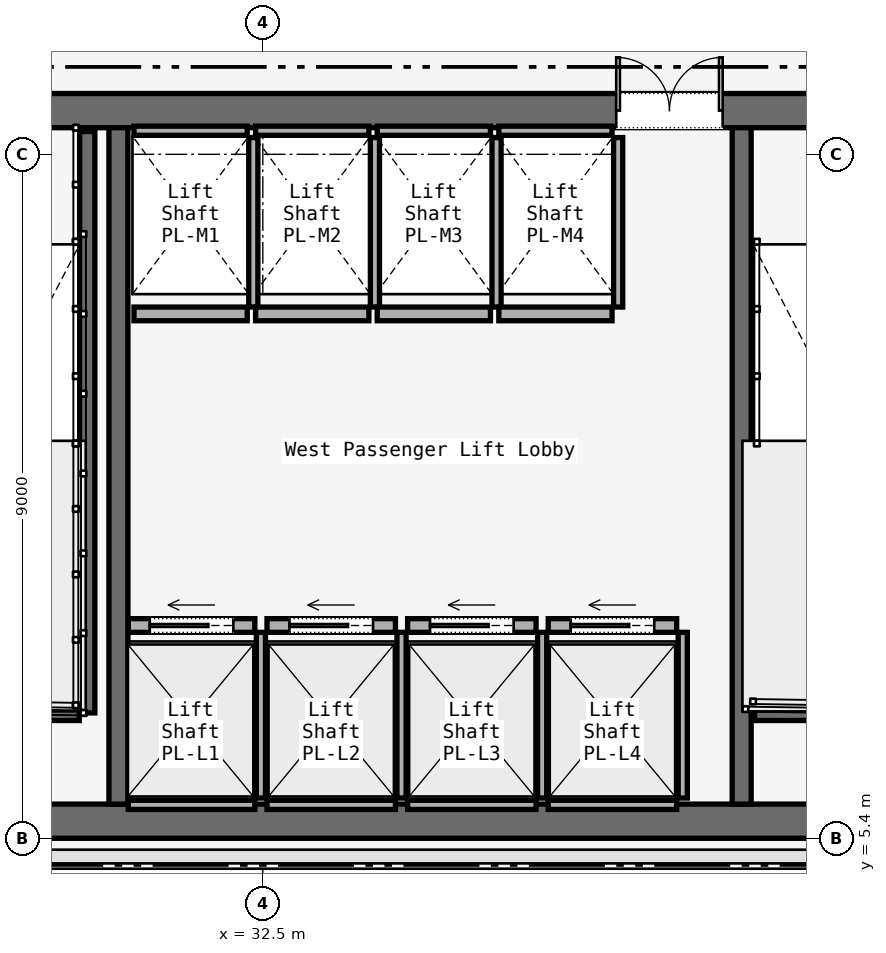
"""IFC4 building model, lengths in metres.
Left out: names, types, materials, properties, quantities, classifications, styles, units other than length and angle.
Written with IfcOpenShell. Run it as: python <this file> out.ifc"""

import sys

from ifc_helpers import new_model, si_unit, direction, frame, frame_2d, origin, place, context, subcontext, project, spatial, rectangle, extrude, element, fill, save


model = new_model("IFC4")
c1 = context("Model", 3, precision=1e-05, world=origin(), true_north=direction((0.0, 1.0)))
c2 = subcontext(c1, "Body", "Model", "MODEL_VIEW")
j1 = project(units=[si_unit("LENGTHUNIT", "METRE"), si_unit("PLANEANGLEUNIT", "RADIAN")], contexts=[c1])
p1 = place(None, origin())
s1 = spatial("IfcSite", under=j1, at=p1, CompositionType="ELEMENT")
p2 = place(p1, origin())
s2 = spatial("IfcBuilding", under=s1, at=p2, CompositionType="ELEMENT")
p3 = place(p2, frame((0.0, 0.0, 70.2)))
s3 = spatial("IfcBuildingStorey", under=s2, at=p3, CompositionType="ELEMENT", Elevation=70.2)
p4 = place(p3, frame((26.45, 14.975, 0.0), z_axis=(0.0, 0.0, 1.0), x_axis=(1.0, 0.0, 0.0)))
e1 = element("IfcWall", 1, at=p4, inside=s3, PredefinedType="SOLIDWALL", context=c2, shape_type="SweptSolid", body=[
    extrude(rectangle(XDim=31.1, YDim=0.45, at=frame_2d((15.55, 0.0))), origin(), (0.0, 0.0, 1.0), 3.58),
])
p5 = place(p4, frame((1.65, 0.0, 0.0)))
e2 = element("IfcOpeningElement", 2, at=p5, cuts=e1, PredefinedType="OPENING", context=c2, shape_type="SweptSolid", body=[
    extrude(rectangle(XDim=1.1, YDim=2.2, at=frame_2d((0.55, 1.1))), frame((0.0, 0.225, 0.0), z_axis=(0.0, -1.0, 0.0), x_axis=(1.0, 0.0, 0.0)), (0.0, 0.0, 1.0), 0.45),
])
p6 = place(p4, frame((13.65, 0.0, 0.0)))
e3 = element("IfcOpeningElement", 3, at=p6, cuts=e1, PredefinedType="OPENING", context=c2, shape_type="SweptSolid", body=[
    extrude(rectangle(XDim=1.1, YDim=2.2, at=frame_2d((0.55, 1.1))), frame((0.0, 0.225, 0.0), z_axis=(0.0, -1.0, 0.0), x_axis=(1.0, 0.0, 0.0)), (0.0, 0.0, 1.0), 0.45),
])
p7 = place(p4, frame((25.55, 0.0, 0.0)))
e4 = element("IfcOpeningElement", 4, at=p7, cuts=e1, PredefinedType="OPENING", context=c2, shape_type="SweptSolid", body=[
    extrude(rectangle(XDim=1.1, YDim=2.2, at=frame_2d((0.55, 1.1))), frame((0.0, 0.225, 0.0), z_axis=(0.0, -1.0, 0.0), x_axis=(1.0, 0.0, 0.0)), (0.0, 0.0, 1.0), 0.45),
])
p8 = place(p4, frame((10.7, 0.0, 0.0)))
e5 = element("IfcOpeningElement", 5, at=p8, cuts=e1, PredefinedType="OPENING", context=c2, shape_type="SweptSolid", body=[
    extrude(rectangle(XDim=1.4, YDim=2.2, at=frame_2d((0.7, 1.1))), frame((0.0, 0.225, 0.0), z_axis=(0.0, -1.0, 0.0), x_axis=(1.0, 0.0, 0.0)), (0.0, 0.0, 1.0), 0.45),
])
p9 = place(p4, frame((19.35, 0.0, 0.0)))
e6 = element("IfcOpeningElement", 6, at=p9, cuts=e1, PredefinedType="OPENING", context=c2, shape_type="SweptSolid", body=[
    extrude(rectangle(XDim=1.1, YDim=2.2, at=frame_2d((0.55, 1.1))), frame((0.0, 0.225, 0.0), z_axis=(0.0, -1.0, 0.0), x_axis=(1.0, 0.0, 0.0)), (0.0, 0.0, 1.0), 0.45),
])
p10 = place(p4, frame((21.4, 0.0, 0.0)))
e7 = element("IfcOpeningElement", 7, at=p10, cuts=e1, PredefinedType="OPENING", context=c2, shape_type="SweptSolid", body=[
    extrude(rectangle(XDim=0.9, YDim=2.1, at=frame_2d((0.45, 1.05))), frame((0.0, 0.225, 0.0), z_axis=(0.0, -1.0, 0.0), x_axis=(1.0, 0.0, 0.0)), (0.0, 0.0, 1.0), 0.45),
])
p11 = place(p4, frame((23.35, 0.0, 0.0)))
e8 = element("IfcOpeningElement", 8, at=p11, cuts=e1, PredefinedType="OPENING", context=c2, shape_type="SweptSolid", body=[
    extrude(rectangle(XDim=1.3, YDim=2.3, at=frame_2d((0.65, 1.15))), frame((0.0, 0.225, 0.0), z_axis=(0.0, -1.0, 0.0), x_axis=(1.0, 0.0, 0.0)), (0.0, 0.0, 1.0), 0.45),
])
p12 = place(p3, frame((26.45, 5.625, 0.0), z_axis=(0.0, 0.0, 1.0), x_axis=(1.0, 0.0, 0.0)))
e9 = element("IfcWall", 9, at=p12, inside=s3, PredefinedType="SOLIDWALL", context=c2, shape_type="SweptSolid", body=[
    extrude(rectangle(XDim=31.1, YDim=0.45, at=frame_2d((15.55, 0.0))), origin(), (0.0, 0.0, 1.0), 3.58),
])
for number, where, z_axis, x_axis in (
    (10, (30.6, 5.85, 0.0), (0.0, 0.0, 1.0), (0.0, 1.0, 0.0)),
    (11, (38.8, 5.85, 0.0), (0.0, 0.0, 1.0), (0.0, 1.0, 0.0)),
):
    element("IfcWall", number, at=place(p3, frame(where, z_axis=z_axis, x_axis=x_axis)), inside=s3, PredefinedType="SOLIDWALL", context=c2, shape_type="SweptSolid", body=[
        extrude(rectangle(XDim=8.9, YDim=0.25, at=frame_2d((4.45, 0.0))), origin(), (0.0, 0.0, 1.0), 3.58),
    ])
p13 = place(p3, frame((30.19, 14.7, 0.0), z_axis=(0.0, 0.0, 1.0), x_axis=(0.0, -1.0, 0.0)))
e12 = element("IfcWall", 12, at=p13, inside=s3, PredefinedType="SOLIDWALL", context=c2, shape_type="SweptSolid", body=[
    extrude(rectangle(XDim=7.65, YDim=0.2, at=frame_2d((3.825, 0.0))), origin(), (0.0, 0.0, 1.0), 3.8),
])
for number, where, z_axis, x_axis in (
    (13, (26.97, 7.05, 0.0), (0.0, 0.0, 1.0), (1.0, 0.0, 0.0)),
    (14, (38.97, 7.05, 0.0), (0.0, 0.0, 1.0), (1.0, 0.0, 0.0)),
):
    element("IfcWall", number, at=place(p3, frame(where, z_axis=z_axis, x_axis=x_axis)), inside=s3, PredefinedType="SOLIDWALL", context=c2, shape_type="SweptSolid", body=[
        extrude(rectangle(XDim=3.115, YDim=0.2, at=frame_2d((1.558, 0.0))), origin(), (0.0, 0.0, 1.0), 3.8),
    ])
p14 = place(p3, frame((30.73, 8.2, 0.0), z_axis=(0.0, 0.0, 1.0), x_axis=(1.0, 0.0, 0.0)))
e15 = element("IfcWall", 15, at=p14, inside=s3, PredefinedType="SOLIDWALL", context=c2, shape_type="SweptSolid", body=[
    extrude(rectangle(XDim=1.665, YDim=0.18, at=frame_2d((0.833, 0.0))), origin(), (0.0, 0.0, 1.0), 2.95),
])
p15 = place(p14, frame((0.282, 0.0, 0.0)))
e16 = element("IfcOpeningElement", 16, at=p15, cuts=e15, PredefinedType="OPENING", context=c2, shape_type="SweptSolid", body=[
    extrude(rectangle(XDim=1.1, YDim=2.2, at=frame_2d((0.55, 1.1))), frame((0.0, 0.09, 0.0), z_axis=(0.0, -1.0, 0.0), x_axis=(1.0, 0.0, 0.0)), (0.0, 0.0, 1.0), 0.18),
])
p16 = place(p3, frame((30.73, 5.84, 0.0), z_axis=(0.0, 0.0, 1.0), x_axis=(1.0, 0.0, 0.0)))
e17 = element("IfcWall", 17, at=p16, inside=s3, PredefinedType="SOLIDWALL", context=c2, shape_type="SweptSolid", body=[
    extrude(rectangle(XDim=1.665, YDim=0.12, at=frame_2d((0.833, 0.0))), origin(), (0.0, 0.0, 1.0), 2.95),
])
p17 = place(p3, frame((32.475, 5.93, 0.0), z_axis=(0.0, 0.0, 1.0), x_axis=(0.0, 1.0, 0.0)))
e18 = element("IfcWall", 18, at=p17, inside=s3, PredefinedType="SOLIDWALL", context=c2, shape_type="SweptSolid", body=[
    extrude(rectangle(XDim=2.18, YDim=0.12, at=frame_2d((1.09, 0.0))), origin(), (0.0, 0.0, 1.0), 2.95),
])
p18 = place(p3, frame((32.555, 8.2, 0.0), z_axis=(0.0, 0.0, 1.0), x_axis=(1.0, 0.0, 0.0)))
e19 = element("IfcWall", 19, at=p18, inside=s3, PredefinedType="SOLIDWALL", context=c2, shape_type="SweptSolid", body=[
    extrude(rectangle(XDim=1.69, YDim=0.18, at=frame_2d((0.845, 0.0))), origin(), (0.0, 0.0, 1.0), 2.95),
])
p19 = place(p18, frame((0.295, 0.0, 0.0)))
e20 = element("IfcOpeningElement", 20, at=p19, cuts=e19, PredefinedType="OPENING", context=c2, shape_type="SweptSolid", body=[
    extrude(rectangle(XDim=1.1, YDim=2.2, at=frame_2d((0.55, 1.1))), frame((0.0, 0.09, 0.0), z_axis=(0.0, -1.0, 0.0), x_axis=(1.0, 0.0, 0.0)), (0.0, 0.0, 1.0), 0.18),
])
p20 = place(p3, frame((32.555, 5.84, 0.0), z_axis=(0.0, 0.0, 1.0), x_axis=(1.0, 0.0, 0.0)))
e21 = element("IfcWall", 21, at=p20, inside=s3, PredefinedType="SOLIDWALL", context=c2, shape_type="SweptSolid", body=[
    extrude(rectangle(XDim=1.69, YDim=0.12, at=frame_2d((0.845, 0.0))), origin(), (0.0, 0.0, 1.0), 2.95),
])
p21 = place(p3, frame((34.325, 5.93, 0.0), z_axis=(0.0, 0.0, 1.0), x_axis=(0.0, 1.0, 0.0)))
e22 = element("IfcWall", 22, at=p21, inside=s3, PredefinedType="SOLIDWALL", context=c2, shape_type="SweptSolid", body=[
    extrude(rectangle(XDim=2.18, YDim=0.12, at=frame_2d((1.09, 0.0))), origin(), (0.0, 0.0, 1.0), 2.95),
])
p22 = place(p3, frame((34.405, 8.2, 0.0), z_axis=(0.0, 0.0, 1.0), x_axis=(1.0, 0.0, 0.0)))
e23 = element("IfcWall", 23, at=p22, inside=s3, PredefinedType="SOLIDWALL", context=c2, shape_type="SweptSolid", body=[
    extrude(rectangle(XDim=1.69, YDim=0.18, at=frame_2d((0.845, 0.0))), origin(), (0.0, 0.0, 1.0), 2.95),
])
p23 = place(p22, frame((0.295, 0.0, 0.0)))
e24 = element("IfcOpeningElement", 24, at=p23, cuts=e23, PredefinedType="OPENING", context=c2, shape_type="SweptSolid", body=[
    extrude(rectangle(XDim=1.1, YDim=2.2, at=frame_2d((0.55, 1.1))), frame((0.0, 0.09, 0.0), z_axis=(0.0, -1.0, 0.0), x_axis=(1.0, 0.0, 0.0)), (0.0, 0.0, 1.0), 0.18),
])
p24 = place(p3, frame((34.405, 5.84, 0.0), z_axis=(0.0, 0.0, 1.0), x_axis=(1.0, 0.0, 0.0)))
e25 = element("IfcWall", 25, at=p24, inside=s3, PredefinedType="SOLIDWALL", context=c2, shape_type="SweptSolid", body=[
    extrude(rectangle(XDim=1.69, YDim=0.12, at=frame_2d((0.845, 0.0))), origin(), (0.0, 0.0, 1.0), 2.95),
])
p25 = place(p3, frame((36.175, 5.93, 0.0), z_axis=(0.0, 0.0, 1.0), x_axis=(0.0, 1.0, 0.0)))
e26 = element("IfcWall", 26, at=p25, inside=s3, PredefinedType="SOLIDWALL", context=c2, shape_type="SweptSolid", body=[
    extrude(rectangle(XDim=2.18, YDim=0.12, at=frame_2d((1.09, 0.0))), origin(), (0.0, 0.0, 1.0), 2.95),
])
p26 = place(p3, frame((36.255, 8.2, 0.0), z_axis=(0.0, 0.0, 1.0), x_axis=(1.0, 0.0, 0.0)))
e27 = element("IfcWall", 27, at=p26, inside=s3, PredefinedType="SOLIDWALL", context=c2, shape_type="SweptSolid", body=[
    extrude(rectangle(XDim=1.69, YDim=0.18, at=frame_2d((0.845, 0.0))), origin(), (0.0, 0.0, 1.0), 2.95),
])
p27 = place(p26, frame((0.295, 0.0, 0.0)))
e28 = element("IfcOpeningElement", 28, at=p27, cuts=e27, PredefinedType="OPENING", context=c2, shape_type="SweptSolid", body=[
    extrude(rectangle(XDim=1.1, YDim=2.2, at=frame_2d((0.55, 1.1))), frame((0.0, 0.09, 0.0), z_axis=(0.0, -1.0, 0.0), x_axis=(1.0, 0.0, 0.0)), (0.0, 0.0, 1.0), 0.18),
])
p28 = place(p3, frame((36.255, 5.84, 0.0), z_axis=(0.0, 0.0, 1.0), x_axis=(1.0, 0.0, 0.0)))
e29 = element("IfcWall", 29, at=p28, inside=s3, PredefinedType="SOLIDWALL", context=c2, shape_type="SweptSolid", body=[
    extrude(rectangle(XDim=1.69, YDim=0.12, at=frame_2d((0.845, 0.0))), origin(), (0.0, 0.0, 1.0), 2.95),
])
p29 = place(p3, frame((38.025, 5.93, 0.0), z_axis=(0.0, 0.0, 1.0), x_axis=(0.0, 1.0, 0.0)))
e30 = element("IfcWall", 30, at=p29, inside=s3, PredefinedType="SOLIDWALL", context=c2, shape_type="SweptSolid", body=[
    extrude(rectangle(XDim=2.18, YDim=0.12, at=frame_2d((1.09, 0.0))), origin(), (0.0, 0.0, 1.0), 2.95),
])
p30 = place(p3, frame((30.805, 12.3, 0.0), z_axis=(0.0, 0.0, 1.0), x_axis=(1.0, 0.0, 0.0)))
e31 = element("IfcWall", 31, at=p30, inside=s3, PredefinedType="SOLIDWALL", context=c2, shape_type="SweptSolid", body=[
    extrude(rectangle(XDim=1.49, YDim=0.18, at=frame_2d((0.745, 0.0))), origin(), (0.0, 0.0, 1.0), 2.95),
])
p31 = place(p3, frame((30.805, 14.71, 0.0), z_axis=(0.0, 0.0, 1.0), x_axis=(1.0, 0.0, 0.0)))
e32 = element("IfcWall", 32, at=p31, inside=s3, PredefinedType="SOLIDWALL", context=c2, shape_type="SweptSolid", body=[
    extrude(rectangle(XDim=1.49, YDim=0.12, at=frame_2d((0.745, 0.0))), origin(), (0.0, 0.0, 1.0), 2.95),
])
p32 = place(p3, frame((32.375, 12.39, 0.0), z_axis=(0.0, 0.0, 1.0), x_axis=(0.0, 1.0, 0.0)))
e33 = element("IfcWall", 33, at=p32, inside=s3, PredefinedType="SOLIDWALL", context=c2, shape_type="SweptSolid", body=[
    extrude(rectangle(XDim=2.23, YDim=0.12, at=frame_2d((1.115, 0.0))), origin(), (0.0, 0.0, 1.0), 2.95),
])
p33 = place(p3, frame((32.405, 12.3, 0.0), z_axis=(0.0, 0.0, 1.0), x_axis=(1.0, 0.0, 0.0)))
e34 = element("IfcWall", 34, at=p33, inside=s3, PredefinedType="SOLIDWALL", context=c2, shape_type="SweptSolid", body=[
    extrude(rectangle(XDim=1.49, YDim=0.18, at=frame_2d((0.745, 0.0))), origin(), (0.0, 0.0, 1.0), 2.95),
])
p34 = place(p3, frame((32.405, 14.71, 0.0), z_axis=(0.0, 0.0, 1.0), x_axis=(1.0, 0.0, 0.0)))
e35 = element("IfcWall", 35, at=p34, inside=s3, PredefinedType="SOLIDWALL", context=c2, shape_type="SweptSolid", body=[
    extrude(rectangle(XDim=1.49, YDim=0.12, at=frame_2d((0.745, 0.0))), origin(), (0.0, 0.0, 1.0), 2.95),
])
p35 = place(p3, frame((33.975, 12.39, 0.0), z_axis=(0.0, 0.0, 1.0), x_axis=(0.0, 1.0, 0.0)))
e36 = element("IfcWall", 36, at=p35, inside=s3, PredefinedType="SOLIDWALL", context=c2, shape_type="SweptSolid", body=[
    extrude(rectangle(XDim=2.23, YDim=0.12, at=frame_2d((1.115, 0.0))), origin(), (0.0, 0.0, 1.0), 2.95),
])
p36 = place(p3, frame((34.005, 12.3, 0.0), z_axis=(0.0, 0.0, 1.0), x_axis=(1.0, 0.0, 0.0)))
e37 = element("IfcWall", 37, at=p36, inside=s3, PredefinedType="SOLIDWALL", context=c2, shape_type="SweptSolid", body=[
    extrude(rectangle(XDim=1.49, YDim=0.18, at=frame_2d((0.745, 0.0))), origin(), (0.0, 0.0, 1.0), 2.95),
])
p37 = place(p3, frame((34.005, 14.71, 0.0), z_axis=(0.0, 0.0, 1.0), x_axis=(1.0, 0.0, 0.0)))
e38 = element("IfcWall", 38, at=p37, inside=s3, PredefinedType="SOLIDWALL", context=c2, shape_type="SweptSolid", body=[
    extrude(rectangle(XDim=1.49, YDim=0.12, at=frame_2d((0.745, 0.0))), origin(), (0.0, 0.0, 1.0), 2.95),
])
p38 = place(p3, frame((35.575, 12.39, 0.0), z_axis=(0.0, 0.0, 1.0), x_axis=(0.0, 1.0, 0.0)))
e39 = element("IfcWall", 39, at=p38, inside=s3, PredefinedType="SOLIDWALL", context=c2, shape_type="SweptSolid", body=[
    extrude(rectangle(XDim=2.23, YDim=0.12, at=frame_2d((1.115, 0.0))), origin(), (0.0, 0.0, 1.0), 2.95),
])
p39 = place(p3, frame((35.605, 12.3, 0.0), z_axis=(0.0, 0.0, 1.0), x_axis=(1.0, 0.0, 0.0)))
e40 = element("IfcWall", 40, at=p39, inside=s3, PredefinedType="SOLIDWALL", context=c2, shape_type="SweptSolid", body=[
    extrude(rectangle(XDim=1.49, YDim=0.18, at=frame_2d((0.745, 0.0))), origin(), (0.0, 0.0, 1.0), 2.95),
])
p40 = place(p3, frame((35.605, 14.71, 0.0), z_axis=(0.0, 0.0, 1.0), x_axis=(1.0, 0.0, 0.0)))
e41 = element("IfcWall", 41, at=p40, inside=s3, PredefinedType="SOLIDWALL", context=c2, shape_type="SweptSolid", body=[
    extrude(rectangle(XDim=1.49, YDim=0.12, at=frame_2d((0.745, 0.0))), origin(), (0.0, 0.0, 1.0), 2.95),
])
p41 = place(p3, frame((37.175, 12.39, 0.0), z_axis=(0.0, 0.0, 1.0), x_axis=(0.0, 1.0, 0.0)))
e42 = element("IfcWall", 42, at=p41, inside=s3, PredefinedType="SOLIDWALL", context=c2, shape_type="SweptSolid", body=[
    extrude(rectangle(XDim=2.23, YDim=0.12, at=frame_2d((1.115, 0.0))), origin(), (0.0, 0.0, 1.0), 2.95),
])
p42 = place(p8, origin())
e43 = element("IfcDoor", 43, at=p42, inside=s3, OperationType="DOUBLE_DOOR_SINGLE_SWING", PredefinedType="DOOR", context=c2, shape_type="SweptSolid", body=[
    extrude(rectangle(XDim=1.4, YDim=2.2, at=frame_2d((0.7, 1.1))), frame((0.0, 0.025, 0.0), z_axis=(0.0, -1.0, 0.0), x_axis=(1.0, 0.0, 0.0)), (0.0, 0.0, 1.0), 0.05),
])
fill(e5, e43)
p43 = place(p15, origin())
e44 = element("IfcDoor", 44, at=p43, inside=s3, OperationType="SLIDING_TO_LEFT", PredefinedType="DOOR", context=c2, shape_type="SweptSolid", body=[
    extrude(rectangle(XDim=1.1, YDim=2.2, at=frame_2d((0.55, 1.1))), frame((0.0, 0.025, 0.0), z_axis=(0.0, -1.0, 0.0), x_axis=(1.0, 0.0, 0.0)), (0.0, 0.0, 1.0), 0.05),
])
fill(e16, e44)
p44 = place(p19, origin())
e45 = element("IfcDoor", 45, at=p44, inside=s3, OperationType="SLIDING_TO_LEFT", PredefinedType="DOOR", context=c2, shape_type="SweptSolid", body=[
    extrude(rectangle(XDim=1.1, YDim=2.2, at=frame_2d((0.55, 1.1))), frame((0.0, 0.025, 0.0), z_axis=(0.0, -1.0, 0.0), x_axis=(1.0, 0.0, 0.0)), (0.0, 0.0, 1.0), 0.05),
])
fill(e20, e45)
p45 = place(p23, origin())
e46 = element("IfcDoor", 46, at=p45, inside=s3, OperationType="SLIDING_TO_LEFT", PredefinedType="DOOR", context=c2, shape_type="SweptSolid", body=[
    extrude(rectangle(XDim=1.1, YDim=2.2, at=frame_2d((0.55, 1.1))), frame((0.0, 0.025, 0.0), z_axis=(0.0, -1.0, 0.0), x_axis=(1.0, 0.0, 0.0)), (0.0, 0.0, 1.0), 0.05),
])
fill(e24, e46)
p46 = place(p27, origin())
e47 = element("IfcDoor", 47, at=p46, inside=s3, OperationType="SLIDING_TO_LEFT", PredefinedType="DOOR", context=c2, shape_type="SweptSolid", body=[
    extrude(rectangle(XDim=1.1, YDim=2.2, at=frame_2d((0.55, 1.1))), frame((0.0, 0.025, 0.0), z_axis=(0.0, -1.0, 0.0), x_axis=(1.0, 0.0, 0.0)), (0.0, 0.0, 1.0), 0.05),
])
fill(e28, e47)
save(model, sys.argv[1])
